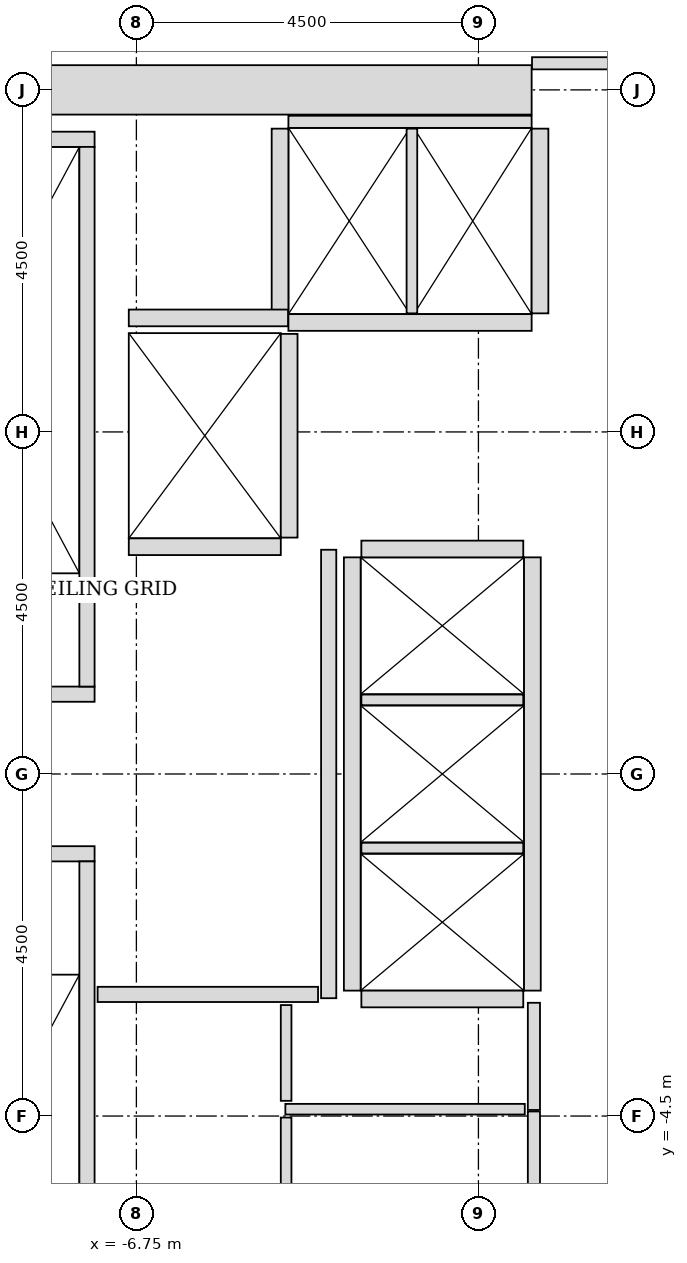
"""IFC4 building model, lengths in metres.
Left out: names, types, materials, properties, quantities, classifications, styles, units other than length and angle.
Written with IfcOpenShell. Run it as: python <this file> out.ifc"""

import sys

from ifc_helpers import new_model, si_unit, direction, frame, frame_2d, origin, place, context, subcontext, project, spatial, rectangle, extrude, source, transform, mapped, element, fill, save


model = new_model("IFC4")
c1 = context("Model", 3, precision=1e-05, world=origin(), true_north=direction((0.0, 1.0)))
c2 = subcontext(c1, "Body", "Model", "MODEL_VIEW")
j1 = project(units=[si_unit("LENGTHUNIT", "METRE"), si_unit("PLANEANGLEUNIT", "RADIAN")], contexts=[c1])
p1 = place(None, origin())
s1 = spatial("IfcSite", under=j1, at=p1, CompositionType="ELEMENT")
p2 = place(p1, origin())
s2 = spatial("IfcBuilding", under=s1, at=p2, CompositionType="ELEMENT")
p3 = place(p2, frame((0.0, 0.0, 40.6)))
s3 = spatial("IfcBuildingStorey", under=s2, at=p3, CompositionType="ELEMENT", Elevation=40.6)
m1 = source(origin(), c2, "Body", "SweptSolid", [
    extrude(rectangle(XDim=10.025, YDim=0.65, at=frame_2d((5.012, 0.0))), origin(), (0.0, 0.0, 1.0), 3.8),
])
p4 = place(p3, frame((-11.575, 9.0, 0.0), z_axis=(0.0, 0.0, 1.0), x_axis=(1.0, 0.0, 0.0)))
e1 = element("IfcWall", 1, at=p4, inside=s3, PredefinedType="SHEAR", context=c2, shape_type="MappedRepresentation", body=[
    mapped(m1, transform((0.0, 0.0, 0.0), x_axis=(1.0, 0.0, 0.0), y_axis=(0.0, 1.0, 0.0), z_axis=(0.0, 0.0, 1.0), scale=1.0)),
])
m2 = source(origin(), c2, "Body", "SweptSolid", [
    extrude(rectangle(XDim=3.4, YDim=0.2, at=frame_2d((1.7, 0.0))), origin(), (0.0, 0.0, 1.0), 3.8),
])
p5 = place(p3, frame((-7.3, 1.05, 0.0), z_axis=(0.0, 0.0, 1.0), x_axis=(-1.0, 0.0, 0.0)))
e2 = element("IfcWall", 2, at=p5, inside=s3, PredefinedType="SOLIDWALL", context=c2, shape_type="MappedRepresentation", body=[
    mapped(m2, transform((0.0, 0.0, 0.0), x_axis=(1.0, 0.0, 0.0), y_axis=(0.0, 1.0, 0.0), z_axis=(0.0, 0.0, 1.0), scale=1.0)),
])
m3 = source(origin(), c2, "Body", "SweptSolid", [
    extrude(rectangle(XDim=3.63, YDim=0.2, at=frame_2d((1.815, 0.0))), origin(), (0.0, 0.0, 1.0), 3.8),
])
p6 = place(p3, frame((-7.3, 8.35, 0.0), z_axis=(0.0, 0.0, 1.0), x_axis=(-1.0, 0.0, 0.0)))
e3 = element("IfcWall", 3, at=p6, inside=s3, PredefinedType="SOLIDWALL", context=c2, shape_type="MappedRepresentation", body=[
    mapped(m3, transform((0.0, 0.0, 0.0), x_axis=(1.0, 0.0, 0.0), y_axis=(0.0, 1.0, 0.0), z_axis=(0.0, 0.0, 1.0), scale=1.0)),
])
m4 = source(origin(), c2, "Body", "SweptSolid", [
    extrude(rectangle(XDim=7.1, YDim=0.2, at=frame_2d((3.55, 0.0))), origin(), (0.0, 0.0, 1.0), 3.8),
])
p7 = place(p3, frame((-7.4, 1.15, 0.0), z_axis=(0.0, 0.0, 1.0), x_axis=(0.0, 1.0, 0.0)))
e4 = element("IfcWall", 4, at=p7, inside=s3, PredefinedType="SOLIDWALL", context=c2, shape_type="MappedRepresentation", body=[
    mapped(m4, transform((0.0, 0.0, 0.0), x_axis=(1.0, 0.0, 0.0), y_axis=(0.0, 1.0, 0.0), z_axis=(0.0, 0.0, 1.0), scale=1.0)),
])
p8 = place(p7, frame((0.18, 0.0, 0.0)))
e5 = element("IfcOpeningElement", 5, at=p8, cuts=e4, PredefinedType="OPENING", context=c2, shape_type="SweptSolid", body=[
    extrude(rectangle(XDim=1.1, YDim=2.15, at=frame_2d((0.55, 1.075))), frame((0.0, 0.11, 0.0), z_axis=(0.0, -1.0, 0.0), x_axis=(1.0, 0.0, 0.0)), (0.0, 0.0, 1.0), 0.22),
])
p9 = place(p3, frame((-10.7, -1.05, 0.0), z_axis=(0.0, 0.0, 1.0), x_axis=(1.0, 0.0, 0.0)))
e6 = element("IfcWall", 6, at=p9, inside=s3, PredefinedType="SOLIDWALL", context=c2, shape_type="MappedRepresentation", body=[
    mapped(m2, transform((0.0, 0.0, 0.0), x_axis=(1.0, 0.0, 0.0), y_axis=(0.0, 1.0, 0.0), z_axis=(0.0, 0.0, 1.0), scale=1.0)),
])
p10 = place(p3, frame((-7.4, -1.15, 0.0), z_axis=(0.0, 0.0, 1.0), x_axis=(0.0, -1.0, 0.0)))
e7 = element("IfcWall", 7, at=p10, inside=s3, PredefinedType="SOLIDWALL", context=c2, shape_type="MappedRepresentation", body=[
    mapped(m4, transform((0.0, 0.0, 0.0), x_axis=(1.0, 0.0, 0.0), y_axis=(0.0, 1.0, 0.0), z_axis=(0.0, 0.0, 1.0), scale=1.0)),
])
p11 = place(p10, frame((0.18, 0.0, 0.0)))
e8 = element("IfcOpeningElement", 8, at=p11, cuts=e7, PredefinedType="OPENING", context=c2, shape_type="SweptSolid", body=[
    extrude(rectangle(XDim=1.1, YDim=2.15, at=frame_2d((0.55, 1.075))), frame((0.0, 0.11, 0.0), z_axis=(0.0, -1.0, 0.0), x_axis=(1.0, 0.0, 0.0)), (0.0, 0.0, 1.0), 0.22),
])
m5 = source(origin(), c2, "Body", "SweptSolid", [
    extrude(rectangle(XDim=2.0, YDim=0.22, at=frame_2d((1.0, 0.0))), origin(), (0.0, 0.0, 1.0), 3.535),
])
p12 = place(p3, frame((-6.85, 2.99, 0.0), z_axis=(0.0, 0.0, 1.0), x_axis=(1.0, 0.0, 0.0)))
e9 = element("IfcWall", 9, at=p12, inside=s3, PredefinedType="SOLIDWALL", context=c2, shape_type="MappedRepresentation", body=[
    mapped(m5, transform((0.0, 0.0, 0.0), x_axis=(1.0, 0.0, 0.0), y_axis=(0.0, 1.0, 0.0), z_axis=(0.0, 0.0, 1.0), scale=1.0)),
])
p13 = place(p12, frame((0.4, 0.0, 0.0)))
e10 = element("IfcOpeningElement", 10, at=p13, cuts=e9, PredefinedType="OPENING", context=c2, shape_type="SweptSolid", body=[
    extrude(rectangle(XDim=1.2, YDim=2.2, at=frame_2d((0.6, 1.1))), frame((0.0, 0.12, 0.0), z_axis=(0.0, -1.0, 0.0), x_axis=(1.0, 0.0, 0.0)), (0.0, 0.0, 1.0), 0.24),
])
m6 = source(origin(), c2, "Body", "SweptSolid", [
    extrude(rectangle(XDim=2.68, YDim=0.22, at=frame_2d((1.34, 0.0))), origin(), (0.0, 0.0, 1.0), 3.535),
])
p14 = place(p3, frame((-4.74, 3.11, 0.0), z_axis=(0.0, 0.0, 1.0), x_axis=(0.0, 1.0, 0.0)))
e11 = element("IfcWall", 11, at=p14, inside=s3, PredefinedType="SOLIDWALL", context=c2, shape_type="MappedRepresentation", body=[
    mapped(m6, transform((0.0, 0.0, 0.0), x_axis=(1.0, 0.0, 0.0), y_axis=(0.0, 1.0, 0.0), z_axis=(0.0, 0.0, 1.0), scale=1.0)),
])
m7 = source(origin(), c2, "Body", "SweptSolid", [
    extrude(rectangle(XDim=3.2, YDim=0.22, at=frame_2d((1.6, 0.0))), origin(), (0.0, 0.0, 1.0), 3.535),
])
p15 = place(p3, frame((-4.75, 5.94, 0.0), z_axis=(0.0, 0.0, 1.0), x_axis=(1.0, 0.0, 0.0)))
e12 = element("IfcWall", 12, at=p15, inside=s3, PredefinedType="SOLIDWALL", context=c2, shape_type="MappedRepresentation", body=[
    mapped(m7, transform((0.0, 0.0, 0.0), x_axis=(1.0, 0.0, 0.0), y_axis=(0.0, 1.0, 0.0), z_axis=(0.0, 0.0, 1.0), scale=1.0)),
])
p16 = place(p15, frame((0.25, 0.0, 0.0)))
e13 = element("IfcOpeningElement", 13, at=p16, cuts=e12, PredefinedType="OPENING", context=c2, shape_type="SweptSolid", body=[
    extrude(rectangle(XDim=1.1, YDim=2.2, at=frame_2d((0.55, 1.1))), frame((0.0, 0.12, 0.0), z_axis=(0.0, -1.0, 0.0), x_axis=(1.0, 0.0, 0.0)), (0.0, 0.0, 1.0), 0.24),
])
p17 = place(p15, frame((1.875, 0.0, 0.0)))
e14 = element("IfcOpeningElement", 14, at=p17, cuts=e12, PredefinedType="OPENING", context=c2, shape_type="SweptSolid", body=[
    extrude(rectangle(XDim=1.1, YDim=2.2, at=frame_2d((0.55, 1.1))), frame((0.0, 0.12, 0.0), z_axis=(0.0, -1.0, 0.0), x_axis=(1.0, 0.0, 0.0)), (0.0, 0.0, 1.0), 0.24),
])
m8 = source(origin(), c2, "Body", "SweptSolid", [
    extrude(rectangle(XDim=3.2, YDim=0.16, at=frame_2d((1.6, 0.0))), origin(), (0.0, 0.0, 1.0), 2.425),
])
p18 = place(p3, frame((-1.55, 8.58, 0.0), z_axis=(0.0, 0.0, 1.0), x_axis=(-1.0, 0.0, 0.0)))
e15 = element("IfcWall", 15, at=p18, inside=s3, PredefinedType="PARTITIONING", context=c2, shape_type="MappedRepresentation", body=[
    mapped(m8, transform((0.0, 0.0, 0.0), x_axis=(1.0, 0.0, 0.0), y_axis=(0.0, 1.0, 0.0), z_axis=(0.0, 0.0, 1.0), scale=1.0)),
])
m9 = source(origin(), c2, "Body", "SweptSolid", [
    extrude(rectangle(XDim=2.43, YDim=0.22, at=frame_2d((1.215, 0.0))), origin(), (0.0, 0.0, 1.0), 3.535),
])
p19 = place(p3, frame((-4.86, 8.49, 0.0), z_axis=(0.0, 0.0, 1.0), x_axis=(0.0, -1.0, 0.0)))
e16 = element("IfcWall", 16, at=p19, inside=s3, PredefinedType="SOLIDWALL", context=c2, shape_type="MappedRepresentation", body=[
    mapped(m9, transform((0.0, 0.0, 0.0), x_axis=(1.0, 0.0, 0.0), y_axis=(0.0, 1.0, 0.0), z_axis=(0.0, 0.0, 1.0), scale=1.0)),
])
m10 = source(origin(), c2, "Body", "SweptSolid", [
    extrude(rectangle(XDim=2.43, YDim=0.14, at=frame_2d((1.215, 0.0))), origin(), (0.0, 0.0, 1.0), 3.535),
])
p20 = place(p3, frame((-3.125, 6.06, 0.0), z_axis=(0.0, 0.0, 1.0), x_axis=(0.0, 1.0, 0.0)))
e17 = element("IfcWall", 17, at=p20, inside=s3, PredefinedType="PARTITIONING", context=c2, shape_type="MappedRepresentation", body=[
    mapped(m10, transform((0.0, 0.0, 0.0), x_axis=(1.0, 0.0, 0.0), y_axis=(0.0, 1.0, 0.0), z_axis=(0.0, 0.0, 1.0), scale=1.0)),
])
p21 = place(p3, frame((-1.44, 6.06, 0.0), z_axis=(0.0, 0.0, 1.0), x_axis=(0.0, 1.0, 0.0)))
e18 = element("IfcWall", 18, at=p21, inside=s3, PredefinedType="SOLIDWALL", context=c2, shape_type="MappedRepresentation", body=[
    mapped(m9, transform((0.0, 0.0, 0.0), x_axis=(1.0, 0.0, 0.0), y_axis=(0.0, 1.0, 0.0), z_axis=(0.0, 0.0, 1.0), scale=1.0)),
])
m11 = source(origin(), c2, "Body", "SweptSolid", [
    extrude(rectangle(XDim=5.7, YDim=0.22, at=frame_2d((2.85, 0.0))), origin(), (0.0, 0.0, 1.0), 3.535),
])
for number, where, z_axis, x_axis in (
    (19, (-1.54, -2.85, 0.0), (0.0, 0.0, 1.0), (0.0, 1.0, 0.0)),
    (20, (-3.91, 2.85, 0.0), (0.0, 0.0, 1.0), (0.0, -1.0, 0.0)),
):
    element("IfcWall", number, at=place(p3, frame(where, z_axis=z_axis, x_axis=x_axis)), inside=s3, PredefinedType="SOLIDWALL", context=c2, shape_type="MappedRepresentation", body=[
        mapped(m11, transform((0.0, 0.0, 0.0), x_axis=(1.0, 0.0, 0.0), y_axis=(0.0, 1.0, 0.0), z_axis=(0.0, 0.0, 1.0), scale=1.0)),
    ])
m12 = source(origin(), c2, "Body", "SweptSolid", [
    extrude(rectangle(XDim=2.13, YDim=0.22, at=frame_2d((1.065, 0.0))), origin(), (0.0, 0.0, 1.0), 3.535),
])
p22 = place(p3, frame((-3.79, -2.96, 0.0), z_axis=(0.0, 0.0, 1.0), x_axis=(1.0, 0.0, 0.0)))
e21 = element("IfcWall", 21, at=p22, inside=s3, PredefinedType="SOLIDWALL", context=c2, shape_type="MappedRepresentation", body=[
    mapped(m12, transform((0.0, 0.0, 0.0), x_axis=(1.0, 0.0, 0.0), y_axis=(0.0, 1.0, 0.0), z_axis=(0.0, 0.0, 1.0), scale=1.0)),
])
m13 = source(origin(), c2, "Body", "SweptSolid", [
    extrude(rectangle(XDim=2.13, YDim=0.14, at=frame_2d((1.065, 0.0))), origin(), (0.0, 0.0, 1.0), 3.535),
])
for number, where, z_axis, x_axis in (
    (22, (-3.79, -0.975, 0.0), (0.0, 0.0, 1.0), (1.0, 0.0, 0.0)),
    (23, (-3.79, 0.975, 0.0), (0.0, 0.0, 1.0), (1.0, 0.0, 0.0)),
):
    element("IfcWall", number, at=place(p3, frame(where, z_axis=z_axis, x_axis=x_axis)), inside=s3, PredefinedType="PARTITIONING", context=c2, shape_type="MappedRepresentation", body=[
        mapped(m13, transform((0.0, 0.0, 0.0), x_axis=(1.0, 0.0, 0.0), y_axis=(0.0, 1.0, 0.0), z_axis=(0.0, 0.0, 1.0), scale=1.0)),
    ])
p23 = place(p3, frame((-1.66, 2.96, 0.0), z_axis=(0.0, 0.0, 1.0), x_axis=(-1.0, 0.0, 0.0)))
e24 = element("IfcWall", 24, at=p23, inside=s3, PredefinedType="SOLIDWALL", context=c2, shape_type="MappedRepresentation", body=[
    mapped(m12, transform((0.0, 0.0, 0.0), x_axis=(1.0, 0.0, 0.0), y_axis=(0.0, 1.0, 0.0), z_axis=(0.0, 0.0, 1.0), scale=1.0)),
])
m14 = source(origin(), c2, "Body", "SweptSolid", [
    extrude(rectangle(XDim=2.095, YDim=0.22, at=frame_2d((1.048, 0.0))), origin(), (0.0, 0.0, 1.0), 3.535),
])
p24 = place(p3, frame((-6.85, 6.0, 0.0), z_axis=(0.0, 0.0, 1.0), x_axis=(1.0, 0.0, 0.0)))
e25 = element("IfcWall", 25, at=p24, inside=s3, PredefinedType="SOLIDWALL", context=c2, shape_type="MappedRepresentation", body=[
    mapped(m14, transform((0.0, 0.0, 0.0), x_axis=(1.0, 0.0, 0.0), y_axis=(0.0, 1.0, 0.0), z_axis=(0.0, 0.0, 1.0), scale=1.0)),
])
m15 = source(origin(), c2, "Body", "SweptSolid", [
    extrude(rectangle(XDim=5.9, YDim=0.2, at=frame_2d((2.95, 0.0))), origin(), (0.0, 0.0, 1.0), 3.535),
])
p25 = place(p3, frame((-4.22, -2.95, 0.0), z_axis=(0.0, 0.0, 1.0), x_axis=(0.0, 1.0, 0.0)))
e26 = element("IfcWall", 26, at=p25, inside=s3, PredefinedType="PARTITIONING", context=c2, shape_type="MappedRepresentation", body=[
    mapped(m15, transform((0.0, 0.0, 0.0), x_axis=(1.0, 0.0, 0.0), y_axis=(0.0, 1.0, 0.0), z_axis=(0.0, 0.0, 1.0), scale=1.0)),
])
m16 = source(origin(), c2, "Body", "SweptSolid", [
    extrude(rectangle(XDim=2.9, YDim=0.2, at=frame_2d((1.45, 0.0))), origin(), (0.0, 0.0, 1.0), 3.535),
])
p26 = place(p3, frame((-7.26, -2.9, 0.0), z_axis=(0.0, 0.0, 1.0), x_axis=(1.0, 0.0, 0.0)))
e27 = element("IfcWall", 27, at=p26, inside=s3, PredefinedType="PARTITIONING", context=c2, shape_type="MappedRepresentation", body=[
    mapped(m16, transform((0.0, 0.0, 0.0), x_axis=(1.0, 0.0, 0.0), y_axis=(0.0, 1.0, 0.0), z_axis=(0.0, 0.0, 1.0), scale=1.0)),
])
m17 = source(origin(), c2, "Body", "SweptSolid", [
    extrude(rectangle(XDim=3.09, YDim=0.16, at=frame_2d((1.545, 0.0))), origin(), (0.0, 0.0, 1.0), 2.425),
])
p27 = place(p3, frame((-1.545, 9.35, 0.0), z_axis=(0.0, 0.0, 1.0), x_axis=(1.0, 0.0, 0.0)))
e28 = element("IfcWall", 28, at=p27, inside=s3, PredefinedType="PARTITIONING", context=c2, shape_type="MappedRepresentation", body=[
    mapped(m17, transform((0.0, 0.0, 0.0), x_axis=(1.0, 0.0, 0.0), y_axis=(0.0, 1.0, 0.0), z_axis=(0.0, 0.0, 1.0), scale=1.0)),
])
p28 = place(p27, frame((0.745, 0.0, 0.0)))
e29 = element("IfcOpeningElement", 29, at=p28, cuts=e28, PredefinedType="OPENING", context=c2, shape_type="SweptSolid", body=[
    extrude(rectangle(XDim=1.6, YDim=2.3, at=frame_2d((0.8, 1.15))), frame((0.0, 0.09, 0.0), z_axis=(0.0, -1.0, 0.0), x_axis=(1.0, 0.0, 0.0)), (0.0, 0.0, 1.0), 0.18),
])
m18 = source(origin(), c2, "Body", "SweptSolid", [
    extrude(rectangle(XDim=1.41, YDim=0.16, at=frame_2d((0.705, 0.0))), origin(), (0.0, 0.0, 1.0), 3.535),
])
p29 = place(p3, frame((-1.52, -4.42, 0.0), z_axis=(0.0, 0.0, 1.0), x_axis=(0.0, 1.0, 0.0)))
e30 = element("IfcWall", 30, at=p29, inside=s3, PredefinedType="PARTITIONING", context=c2, shape_type="MappedRepresentation", body=[
    mapped(m18, transform((0.0, 0.0, 0.0), x_axis=(1.0, 0.0, 0.0), y_axis=(0.0, 1.0, 0.0), z_axis=(0.0, 0.0, 1.0), scale=1.0)),
])
p30 = place(p29, frame((0.28, 0.0, 0.0)))
e31 = element("IfcOpeningElement", 31, at=p30, cuts=e30, PredefinedType="OPENING", context=c2, shape_type="SweptSolid", body=[
    extrude(rectangle(XDim=0.85, YDim=2.1, at=frame_2d((0.425, 1.05))), frame((0.0, 0.09, 0.0), z_axis=(0.0, -1.0, 0.0), x_axis=(1.0, 0.0, 0.0)), (0.0, 0.0, 1.0), 0.18),
])
m19 = source(origin(), c2, "Body", "SweptSolid", [
    extrude(rectangle(XDim=3.15, YDim=0.14, at=frame_2d((1.575, 0.0))), origin(), (0.0, 0.0, 1.0), 3.535),
])
p31 = place(p3, frame((-4.79, -4.41, 0.0), z_axis=(0.0, 0.0, 1.0), x_axis=(1.0, 0.0, 0.0)))
e32 = element("IfcWall", 32, at=p31, inside=s3, PredefinedType="PARTITIONING", context=c2, shape_type="MappedRepresentation", body=[
    mapped(m19, transform((0.0, 0.0, 0.0), x_axis=(1.0, 0.0, 0.0), y_axis=(0.0, 1.0, 0.0), z_axis=(0.0, 0.0, 1.0), scale=1.0)),
])
m20 = source(origin(), c2, "Body", "SweptSolid", [
    extrude(rectangle(XDim=1.26, YDim=0.14, at=frame_2d((0.63, 0.0))), origin(), (0.0, 0.0, 1.0), 3.535),
])
p32 = place(p3, frame((-4.78, -4.3, 0.0), z_axis=(0.0, 0.0, 1.0), x_axis=(0.0, 1.0, 0.0)))
e33 = element("IfcWall", 33, at=p32, inside=s3, PredefinedType="PARTITIONING", context=c2, shape_type="MappedRepresentation", body=[
    mapped(m20, transform((0.0, 0.0, 0.0), x_axis=(1.0, 0.0, 0.0), y_axis=(0.0, 1.0, 0.0), z_axis=(0.0, 0.0, 1.0), scale=1.0)),
])
m21 = source(origin(), c2, "Body", "SweptSolid", [
    extrude(rectangle(XDim=1.45, YDim=0.16, at=frame_2d((0.725, 0.0))), origin(), (0.0, 0.0, 1.0), 3.535),
])
p33 = place(p3, frame((-1.52, -5.89, 0.0), z_axis=(0.0, 0.0, 1.0), x_axis=(0.0, 1.0, 0.0)))
e34 = element("IfcWall", 34, at=p33, inside=s3, PredefinedType="PARTITIONING", context=c2, shape_type="MappedRepresentation", body=[
    mapped(m21, transform((0.0, 0.0, 0.0), x_axis=(1.0, 0.0, 0.0), y_axis=(0.0, 1.0, 0.0), z_axis=(0.0, 0.0, 1.0), scale=1.0)),
])
p34 = place(p33, frame((0.3, 0.0, 0.0)))
e35 = element("IfcOpeningElement", 35, at=p34, cuts=e34, PredefinedType="OPENING", context=c2, shape_type="SweptSolid", body=[
    extrude(rectangle(XDim=0.85, YDim=2.1, at=frame_2d((0.425, 1.05))), frame((0.0, 0.09, 0.0), z_axis=(0.0, -1.0, 0.0), x_axis=(1.0, 0.0, 0.0)), (0.0, 0.0, 1.0), 0.18),
])
m22 = source(origin(), c2, "Body", "SweptSolid", [
    extrude(rectangle(XDim=1.37, YDim=0.14, at=frame_2d((0.685, 0.0))), origin(), (0.0, 0.0, 1.0), 3.535),
])
p35 = place(p3, frame((-4.78, -5.89, 0.0), z_axis=(0.0, 0.0, 1.0), x_axis=(0.0, 1.0, 0.0)))
e36 = element("IfcWall", 36, at=p35, inside=s3, PredefinedType="PARTITIONING", context=c2, shape_type="MappedRepresentation", body=[
    mapped(m22, transform((0.0, 0.0, 0.0), x_axis=(1.0, 0.0, 0.0), y_axis=(0.0, 1.0, 0.0), z_axis=(0.0, 0.0, 1.0), scale=1.0)),
])
m23 = source(origin(), c2, "Body", "SweptSolid", [
    extrude(rectangle(XDim=1.1, YDim=2.15, at=frame_2d((0.55, 1.075))), frame((0.0, 0.025, 0.0), z_axis=(0.0, -1.0, 0.0), x_axis=(1.0, 0.0, 0.0)), (0.0, 0.0, 1.0), 0.05),
])
p36 = place(p8, origin())
e37 = element("IfcDoor", 37, at=p36, inside=s3, OperationType="SINGLE_SWING_RIGHT", PredefinedType="DOOR", context=c2, shape_type="MappedRepresentation", body=[
    mapped(m23, transform((0.0, 0.0, 0.0), x_axis=(1.0, 0.0, 0.0), y_axis=(0.0, 1.0, 0.0), z_axis=(0.0, 0.0, 1.0), scale=1.0)),
])
fill(e5, e37)
p37 = place(p11, origin())
e38 = element("IfcDoor", 38, at=p37, inside=s3, OperationType="SINGLE_SWING_RIGHT", PredefinedType="DOOR", context=c2, shape_type="MappedRepresentation", body=[
    mapped(m23, transform((0.0, 0.0, 0.0), x_axis=(1.0, 0.0, 0.0), y_axis=(0.0, 1.0, 0.0), z_axis=(0.0, 0.0, 1.0), scale=1.0)),
])
fill(e8, e38)
m24 = source(origin(), c2, "Body", "SweptSolid", [
    extrude(rectangle(XDim=1.2, YDim=2.2, at=frame_2d((0.6, 1.1))), frame((0.0, 0.025, 0.0), z_axis=(0.0, -1.0, 0.0), x_axis=(1.0, 0.0, 0.0)), (0.0, 0.0, 1.0), 0.05),
])
p38 = place(p13, origin())
e39 = element("IfcDoor", 39, at=p38, inside=s3, OperationType="SLIDING_TO_LEFT", PredefinedType="DOOR", context=c2, shape_type="MappedRepresentation", body=[
    mapped(m24, transform((0.0, 0.0, 0.0), x_axis=(1.0, 0.0, 0.0), y_axis=(0.0, 1.0, 0.0), z_axis=(0.0, 0.0, 1.0), scale=1.0)),
])
fill(e10, e39)
m25 = source(origin(), c2, "Body", "SweptSolid", [
    extrude(rectangle(XDim=1.1, YDim=2.2, at=frame_2d((0.55, 1.1))), frame((0.0, 0.025, 0.0), z_axis=(0.0, -1.0, 0.0), x_axis=(1.0, 0.0, 0.0)), (0.0, 0.0, 1.0), 0.05),
])
p39 = place(p16, origin())
e40 = element("IfcDoor", 40, at=p39, inside=s3, OperationType="DOUBLE_DOOR_SLIDING", PredefinedType="DOOR", context=c2, shape_type="MappedRepresentation", body=[
    mapped(m25, transform((0.0, 0.0, 0.0), x_axis=(1.0, 0.0, 0.0), y_axis=(0.0, 1.0, 0.0), z_axis=(0.0, 0.0, 1.0), scale=1.0)),
])
fill(e13, e40)
p40 = place(p17, origin())
e41 = element("IfcDoor", 41, at=p40, inside=s3, OperationType="DOUBLE_DOOR_SLIDING", PredefinedType="DOOR", context=c2, shape_type="MappedRepresentation", body=[
    mapped(m25, transform((0.0, 0.0, 0.0), x_axis=(1.0, 0.0, 0.0), y_axis=(0.0, 1.0, 0.0), z_axis=(0.0, 0.0, 1.0), scale=1.0)),
])
fill(e14, e41)
m26 = source(origin(), c2, "Body", "SweptSolid", [
    extrude(rectangle(XDim=1.6, YDim=2.3, at=frame_2d((0.8, 1.15))), frame((0.0, 0.025, 0.0), z_axis=(0.0, -1.0, 0.0), x_axis=(1.0, 0.0, 0.0)), (0.0, 0.0, 1.0), 0.05),
])
p41 = place(p28, origin())
e42 = element("IfcDoor", 42, at=p41, inside=s3, OperationType="DOUBLE_DOOR_SINGLE_SWING", PredefinedType="DOOR", context=c2, shape_type="MappedRepresentation", body=[
    mapped(m26, transform((0.0, 0.0, 0.0), x_axis=(1.0, 0.0, 0.0), y_axis=(0.0, 1.0, 0.0), z_axis=(0.0, 0.0, 1.0), scale=1.0)),
])
fill(e29, e42)
m27 = source(origin(), c2, "Body", "SweptSolid", [
    extrude(rectangle(XDim=0.85, YDim=2.1, at=frame_2d((0.425, 1.05))), frame((0.0, 0.025, 0.0), z_axis=(0.0, -1.0, 0.0), x_axis=(1.0, 0.0, 0.0)), (0.0, 0.0, 1.0), 0.05),
])
p42 = place(p30, origin())
e43 = element("IfcDoor", 43, at=p42, inside=s3, OperationType="SINGLE_SWING_RIGHT", PredefinedType="DOOR", context=c2, shape_type="MappedRepresentation", body=[
    mapped(m27, transform((0.0, 0.0, 0.0), x_axis=(1.0, 0.0, 0.0), y_axis=(0.0, 1.0, 0.0), z_axis=(0.0, 0.0, 1.0), scale=1.0)),
])
fill(e31, e43)
p43 = place(p34, origin())
e44 = element("IfcDoor", 44, at=p43, inside=s3, OperationType="SINGLE_SWING_LEFT", PredefinedType="DOOR", context=c2, shape_type="MappedRepresentation", body=[
    mapped(m27, transform((0.0, 0.0, 0.0), x_axis=(1.0, 0.0, 0.0), y_axis=(0.0, 1.0, 0.0), z_axis=(0.0, 0.0, 1.0), scale=1.0)),
])
fill(e35, e44)
save(model, sys.argv[1])
